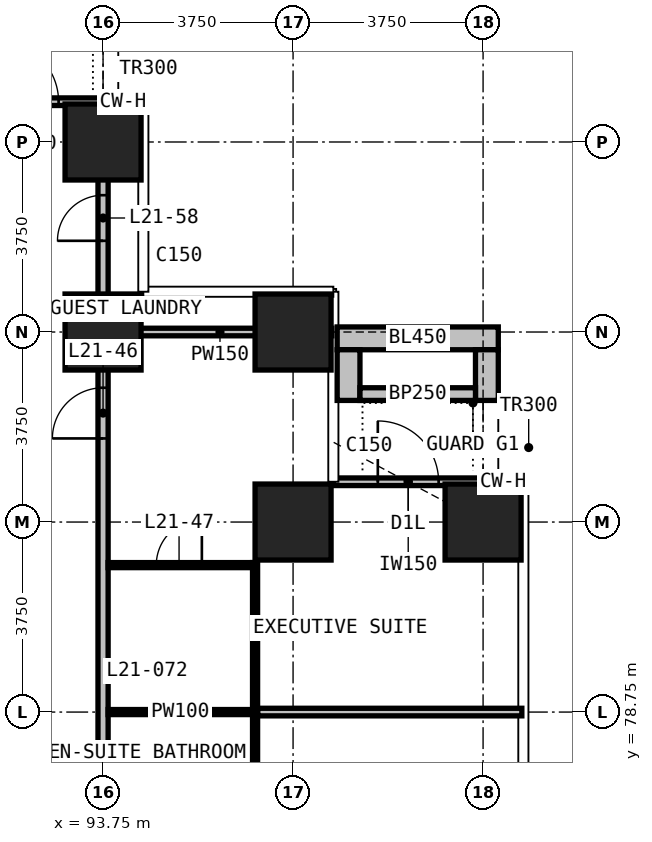
"""IFC4 building model, lengths in metres.
Left out: names, types, materials, properties, quantities, classifications, styles, units other than length and angle.
Written with IfcOpenShell. Run it as: python <this file> out.ifc"""

import sys

from ifc_helpers import new_model, si_unit, direction, frame, frame_2d, origin, origin_2d, place, context, subcontext, project, spatial, rectangle, extrude, element, fill, save


model = new_model("IFC4")
c1 = context("Model", 3, precision=1e-05, world=origin(), true_north=direction((0.0, 1.0)))
c2 = subcontext(c1, "Body", "Model", "MODEL_VIEW")
j1 = project(units=[si_unit("LENGTHUNIT", "METRE"), si_unit("PLANEANGLEUNIT", "RADIAN")], contexts=[c1])
p1 = place(None, origin())
s1 = spatial("IfcSite", under=j1, at=p1, CompositionType="ELEMENT")
p2 = place(p1, origin())
s2 = spatial("IfcBuilding", under=s1, at=p2, CompositionType="ELEMENT")
p3 = place(p2, frame((0.0, 0.0, 89.0)))
s3 = spatial("IfcBuildingStorey", under=s2, at=p3, CompositionType="ELEMENT", Elevation=89.0)
for number, where, z_axis, x_axis in (
    (1, (93.75, 86.25, 0.0), (0.0, 0.0, 1.0), (1.0, 0.0, 0.0)),
    (2, (93.75, 90.0, 0.0), (0.0, 0.0, 1.0), (1.0, 0.0, 0.0)),
    (3, (97.5, 82.5, 0.0), (0.0, 0.0, 1.0), (1.0, 0.0, 0.0)),
    (4, (97.5, 86.25, 0.0), (0.0, 0.0, 1.0), (1.0, 0.0, 0.0)),
    (5, (101.25, 82.5, 0.0), (0.0, 0.0, 1.0), (1.0, 0.0, 0.0)),
):
    element("IfcColumn", number, at=place(p3, frame(where, z_axis=z_axis, x_axis=x_axis)), inside=s3, PredefinedType="COLUMN", context=c2, shape_type="SweptSolid", body=[
        extrude(rectangle(XDim=1.5, YDim=1.5, at=origin_2d()), origin(), (0.0, 0.0, 1.0), 3.3),
    ])
p4 = place(p3, frame((98.295, 83.295, 0.0), z_axis=(0.0, 0.0, 1.0), x_axis=(1.0, 0.0, 0.0)))
e6 = element("IfcWall", 6, at=p4, inside=s3, PredefinedType="SOLIDWALL", context=c2, shape_type="SweptSolid", body=[
    extrude(rectangle(XDim=2.955, YDim=0.15, at=frame_2d((1.478, 0.0))), origin(), (0.0, 0.0, 1.0), 3.0),
])
p5 = place(p4, frame((0.877, 0.0, 0.0)))
e7 = element("IfcOpeningElement", 7, at=p5, cuts=e6, PredefinedType="OPENING", context=c2, shape_type="SweptSolid", body=[
    extrude(rectangle(XDim=1.2, YDim=2.0, at=frame_2d((0.6, 1.0))), frame((0.0, 0.085, 0.0), z_axis=(0.0, -1.0, 0.0), x_axis=(1.0, 0.0, 0.0)), (0.0, 0.0, 1.0), 0.17),
])
p6 = place(p3, frame((90.795, 90.795, 0.0), z_axis=(0.0, 0.0, 1.0), x_axis=(1.0, 0.0, 0.0)))
e8 = element("IfcWall", 8, at=p6, inside=s3, PredefinedType="SOLIDWALL", context=c2, shape_type="SweptSolid", body=[
    extrude(rectangle(XDim=2.955, YDim=0.15, at=frame_2d((1.478, 0.0))), origin(), (0.0, 0.0, 1.0), 3.0),
])
p7 = place(p6, frame((0.877, 0.0, 0.0)))
e9 = element("IfcOpeningElement", 9, at=p7, cuts=e8, PredefinedType="OPENING", context=c2, shape_type="SweptSolid", body=[
    extrude(rectangle(XDim=1.2, YDim=2.4, at=frame_2d((0.6, 1.2))), frame((0.0, 0.085, 0.0), z_axis=(0.0, -1.0, 0.0), x_axis=(1.0, 0.0, 0.0)), (0.0, 0.0, 1.0), 0.17),
])
p8 = place(p3, frame((98.37, 86.125, 0.0), z_axis=(0.0, 0.0, 1.0), x_axis=(1.0, 0.0, 0.0)))
e10 = element("IfcWall", 10, at=p8, inside=s3, PredefinedType="USERDEFINED", context=c2, shape_type="SweptSolid", body=[
    extrude(rectangle(XDim=3.18, YDim=0.45, at=frame_2d((1.59, 0.0))), origin(), (0.0, 0.0, 1.0), 1.1),
])
for number, where, z_axis, x_axis in (
    (11, (98.595, 84.9, 0.0), (0.0, 0.0, 1.0), (0.0, 1.0, 0.0)),
    (12, (101.325, 84.9, 0.0), (0.0, 0.0, 1.0), (0.0, 1.0, 0.0)),
):
    element("IfcWall", number, at=place(p3, frame(where, z_axis=z_axis, x_axis=x_axis)), inside=s3, PredefinedType="USERDEFINED", context=c2, shape_type="SweptSolid", body=[
        extrude(rectangle(XDim=1.0, YDim=0.45, at=frame_2d((0.5, 0.0))), origin(), (0.0, 0.0, 1.0), 1.1),
    ])
p9 = place(p3, frame((98.82, 85.025, 0.0), z_axis=(0.0, 0.0, 1.0), x_axis=(1.0, 0.0, 0.0)))
e13 = element("IfcWall", 13, at=p9, inside=s3, PredefinedType="USERDEFINED", context=c2, shape_type="SweptSolid", body=[
    extrude(rectangle(XDim=2.28, YDim=0.25, at=frame_2d((1.14, 0.0))), origin(), (0.0, 0.0, 1.0), 1.0),
])
p10 = place(p3, frame((93.75, 52.4, 0.0), z_axis=(0.0, 0.0, 1.0), x_axis=(0.0, 1.0, 0.0)))
e14 = element("IfcWall", 14, at=p10, inside=s3, PredefinedType="PARTITIONING", context=c2, shape_type="SweptSolid", body=[
    extrude(rectangle(XDim=38.31, YDim=0.2, at=frame_2d((19.155, 0.0))), origin(), (0.0, 0.0, 1.0), 3.0),
])
p11 = place(p10, frame((2.35, 0.0, 0.0)))
e15 = element("IfcOpeningElement", 15, at=p11, cuts=e14, PredefinedType="OPENING", context=c2, shape_type="SweptSolid", body=[
    extrude(rectangle(XDim=1.0, YDim=2.2, at=frame_2d((0.5, 1.1))), frame((0.0, 0.11, 0.0), z_axis=(0.0, -1.0, 0.0), x_axis=(1.0, 0.0, 0.0)), (0.0, 0.0, 1.0), 0.22),
])
p12 = place(p10, frame((4.95, 0.0, 0.0)))
e16 = element("IfcOpeningElement", 16, at=p12, cuts=e14, PredefinedType="OPENING", context=c2, shape_type="SweptSolid", body=[
    extrude(rectangle(XDim=1.0, YDim=2.2, at=frame_2d((0.5, 1.1))), frame((0.0, 0.11, 0.0), z_axis=(0.0, -1.0, 0.0), x_axis=(1.0, 0.0, 0.0)), (0.0, 0.0, 1.0), 0.22),
])
p13 = place(p10, frame((16.75, 0.0, 0.0)))
e17 = element("IfcOpeningElement", 17, at=p13, cuts=e14, PredefinedType="OPENING", context=c2, shape_type="SweptSolid", body=[
    extrude(rectangle(XDim=1.0, YDim=2.2, at=frame_2d((0.5, 1.1))), frame((0.0, 0.11, 0.0), z_axis=(0.0, -1.0, 0.0), x_axis=(1.0, 0.0, 0.0)), (0.0, 0.0, 1.0), 0.22),
])
p14 = place(p10, frame((19.95, 0.0, 0.0)))
e18 = element("IfcOpeningElement", 18, at=p14, cuts=e14, PredefinedType="OPENING", context=c2, shape_type="SweptSolid", body=[
    extrude(rectangle(XDim=1.0, YDim=2.2, at=frame_2d((0.5, 1.1))), frame((0.0, 0.11, 0.0), z_axis=(0.0, -1.0, 0.0), x_axis=(1.0, 0.0, 0.0)), (0.0, 0.0, 1.0), 0.22),
])
p15 = place(p10, frame((31.75, 0.0, 0.0)))
e19 = element("IfcOpeningElement", 19, at=p15, cuts=e14, PredefinedType="OPENING", context=c2, shape_type="SweptSolid", body=[
    extrude(rectangle(XDim=1.0, YDim=2.2, at=frame_2d((0.5, 1.1))), frame((0.0, 0.11, 0.0), z_axis=(0.0, -1.0, 0.0), x_axis=(1.0, 0.0, 0.0)), (0.0, 0.0, 1.0), 0.22),
])
p16 = place(p10, frame((35.65, 0.0, 0.0)))
e20 = element("IfcOpeningElement", 20, at=p16, cuts=e14, PredefinedType="OPENING", context=c2, shape_type="SweptSolid", body=[
    extrude(rectangle(XDim=0.9, YDim=2.2, at=frame_2d((0.45, 1.1))), frame((0.0, 0.11, 0.0), z_axis=(0.0, -1.0, 0.0), x_axis=(1.0, 0.0, 0.0)), (0.0, 0.0, 1.0), 0.22),
])
p17 = place(p3, frame((96.8, 78.75, 0.0), z_axis=(0.0, 0.0, 1.0), x_axis=(1.0, 0.0, 0.0)))
e21 = element("IfcWall", 21, at=p17, inside=s3, PredefinedType="PARTITIONING", context=c2, shape_type="SweptSolid", body=[
    extrude(rectangle(XDim=5.215, YDim=0.15, at=frame_2d((2.607, 0.0))), origin(), (0.0, 0.0, 1.0), 3.0),
])
p18 = place(p3, frame((93.85, 86.25, 0.0), z_axis=(0.0, 0.0, 1.0), x_axis=(1.0, 0.0, 0.0)))
e22 = element("IfcWall", 22, at=p18, inside=s3, PredefinedType="PARTITIONING", context=c2, shape_type="SweptSolid", body=[
    extrude(rectangle(XDim=4.415, YDim=0.15, at=frame_2d((2.208, 0.0))), origin(), (0.0, 0.0, 1.0), 3.0),
])
p19 = place(p3, frame((93.85, 78.75, 0.0), z_axis=(0.0, 0.0, 1.0), x_axis=(1.0, 0.0, 0.0)))
e23 = element("IfcWall", 23, at=p19, inside=s3, PredefinedType="PARTITIONING", context=c2, shape_type="SweptSolid", body=[
    extrude(rectangle(XDim=2.85, YDim=0.1, at=frame_2d((1.425, 0.0))), origin(), (0.0, 0.0, 1.0), 3.0),
])
p20 = place(p3, frame((93.85, 81.65, 0.0), z_axis=(0.0, 0.0, 1.0), x_axis=(1.0, 0.0, 0.0)))
e24 = element("IfcWall", 24, at=p20, inside=s3, PredefinedType="PARTITIONING", context=c2, shape_type="SweptSolid", body=[
    extrude(rectangle(XDim=2.85, YDim=0.1, at=frame_2d((1.425, 0.0))), origin(), (0.0, 0.0, 1.0), 3.0),
])
p21 = place(p20, frame((0.95, 0.0, 0.0)))
e25 = element("IfcOpeningElement", 25, at=p21, cuts=e24, PredefinedType="OPENING", context=c2, shape_type="SweptSolid", body=[
    extrude(rectangle(XDim=0.9, YDim=2.2, at=frame_2d((0.45, 1.1))), frame((0.0, 0.06, 0.0), z_axis=(0.0, -1.0, 0.0), x_axis=(1.0, 0.0, 0.0)), (0.0, 0.0, 1.0), 0.12),
])
p22 = place(p3, frame((96.75, 75.8, 0.0), z_axis=(0.0, 0.0, 1.0), x_axis=(0.0, 1.0, 0.0)))
e26 = element("IfcWall", 26, at=p22, inside=s3, PredefinedType="PARTITIONING", context=c2, shape_type="SweptSolid", body=[
    extrude(rectangle(XDim=5.9, YDim=0.1, at=frame_2d((2.95, 0.0))), origin(), (0.0, 0.0, 1.0), 3.0),
])
p23 = place(p5, origin())
e27 = element("IfcDoor", 27, at=p23, inside=s3, OperationType="SINGLE_SWING_LEFT", PredefinedType="DOOR", context=c2, shape_type="SweptSolid", body=[
    extrude(rectangle(XDim=1.2, YDim=2.0, at=frame_2d((0.6, 1.0))), frame((0.0, 0.025, 0.0), z_axis=(0.0, -1.0, 0.0), x_axis=(1.0, 0.0, 0.0)), (0.0, 0.0, 1.0), 0.05),
])
fill(e7, e27)
p24 = place(p7, origin())
e28 = element("IfcDoor", 28, at=p24, inside=s3, OperationType="SINGLE_SWING_LEFT", PredefinedType="DOOR", context=c2, shape_type="SweptSolid", body=[
    extrude(rectangle(XDim=1.2, YDim=2.4, at=frame_2d((0.6, 1.2))), frame((0.0, 0.025, 0.0), z_axis=(0.0, -1.0, 0.0), x_axis=(1.0, 0.0, 0.0)), (0.0, 0.0, 1.0), 0.05),
])
fill(e9, e28)
p25 = place(p15, origin())
e29 = element("IfcDoor", 29, at=p25, inside=s3, OperationType="SINGLE_SWING_RIGHT", PredefinedType="DOOR", context=c2, shape_type="SweptSolid", body=[
    extrude(rectangle(XDim=1.0, YDim=2.2, at=frame_2d((0.5, 1.1))), frame((0.0, 0.025, 0.0), z_axis=(0.0, -1.0, 0.0), x_axis=(1.0, 0.0, 0.0)), (0.0, 0.0, 1.0), 0.05),
])
fill(e19, e29)
p26 = place(p21, origin())
e30 = element("IfcDoor", 30, at=p26, inside=s3, OperationType="SINGLE_SWING_RIGHT", PredefinedType="DOOR", context=c2, shape_type="SweptSolid", body=[
    extrude(rectangle(XDim=0.9, YDim=2.2, at=frame_2d((0.45, 1.1))), frame((0.0, 0.025, 0.0), z_axis=(0.0, -1.0, 0.0), x_axis=(1.0, 0.0, 0.0)), (0.0, 0.0, 1.0), 0.05),
])
fill(e25, e30)
p27 = place(p16, origin())
e31 = element("IfcDoor", 31, at=p27, inside=s3, OperationType="SINGLE_SWING_RIGHT", PredefinedType="DOOR", context=c2, shape_type="SweptSolid", body=[
    extrude(rectangle(XDim=0.9, YDim=2.2, at=frame_2d((0.45, 1.1))), frame((0.0, 0.025, 0.0), z_axis=(0.0, -1.0, 0.0), x_axis=(1.0, 0.0, 0.0)), (0.0, 0.0, 1.0), 0.05),
])
fill(e20, e31)
save(model, sys.argv[1])
